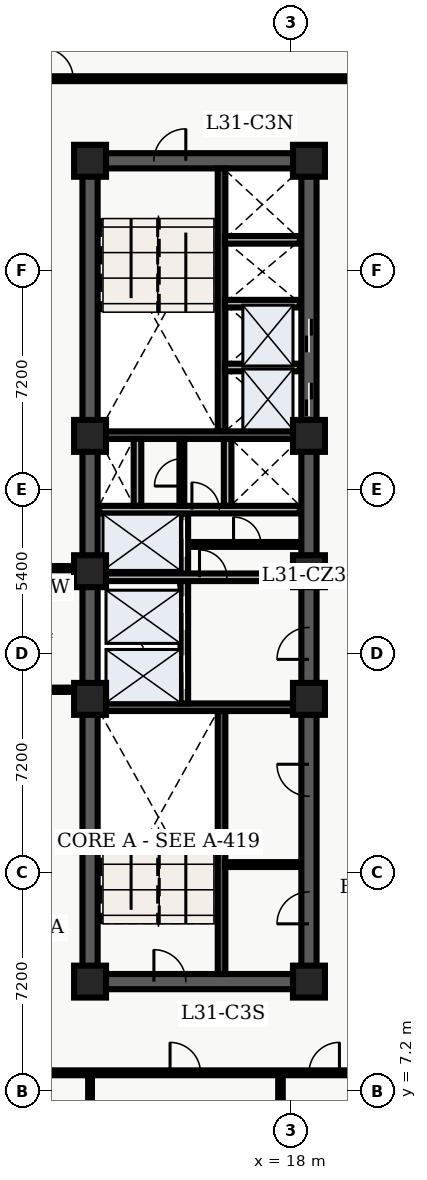
"""IFC4 building model, lengths in metres.
Left out: names, types, materials, properties, quantities, classifications, styles, units other than length and angle.
Written with IfcOpenShell. Run it as: python <this file> out.ifc"""

import sys

from ifc_helpers import new_model, entity, si_unit, converted_unit, direction, frame, origin_with_axes, origin_2d_with_axis, place, context, subcontext, project, spatial, polyline, rectangle, outline, extrude, element, fill, save


model = new_model("IFC4")
c1 = context("Model", 3, precision=1e-05, world=origin_with_axes(), true_north=direction((0.0, 1.0)))
c2 = subcontext(c1, "Body", "Model", "MODEL_VIEW")
j1 = project(units=[si_unit("LENGTHUNIT", "METRE"), converted_unit("PLANEANGLEUNIT", "DEGREE", entity("IfcPlaneAngleMeasure", 0.017), si_unit("PLANEANGLEUNIT", "RADIAN"), dimensions=[0, 0, 0, 0, 0, 0, 0])], contexts=[c1])
p1 = place(None, origin_with_axes())
s1 = spatial("IfcSite", under=j1, at=p1, CompositionType="ELEMENT")
p2 = place(p1, origin_with_axes())
s2 = spatial("IfcBuilding", under=s1, at=p2, CompositionType="ELEMENT")
p3 = place(p2, frame((0.0, 0.0, 129.0), z_axis=(0.0, 0.0, 1.0), x_axis=(1.0, 0.0, 0.0)))
s3 = spatial("IfcBuildingStorey", under=s2, at=p3, CompositionType="ELEMENT", Elevation=129.0)
p4 = place(p3, frame((11.4, 10.8, 0.0), z_axis=(0.0, 0.0, 1.0), x_axis=(0.0, 1.0, 0.0)))
e1 = element("IfcWall", 1, at=p4, inside=s3, PredefinedType="SHEAR", context=c2, shape_type="SweptSolid", body=[
    extrude(outline(polyline([(0.0, -0.25), (27.0, -0.25), (27.0, 0.25), (0.0, 0.25), (0.0, -0.25)])), origin_with_axes(), (0.0, 0.0, 1.0), 3.66),
])
p5 = place(p3, frame((11.4, 10.8, 0.0), z_axis=(0.0, 0.0, 1.0), x_axis=(1.0, 0.0, 0.0)))
e2 = element("IfcWall", 2, at=p5, inside=s3, PredefinedType="SHEAR", context=c2, shape_type="SweptSolid", body=[
    extrude(outline(polyline([(0.0, -0.25), (7.2, -0.25), (7.2, 0.25), (0.0, 0.25), (0.0, -0.25)])), origin_with_axes(), (0.0, 0.0, 1.0), 3.66),
])
p6 = place(p5, frame((2.625, 0.0, 0.0), z_axis=(0.0, 0.0, 1.0), x_axis=(1.0, 0.0, 0.0)))
e3 = element("IfcOpeningElement", 3, at=p6, cuts=e2, PredefinedType="OPENING", context=c2, shape_type="SweptSolid", body=[
    extrude(rectangle(XDim=1.05, YDim=0.52, at=origin_2d_with_axis()), origin_with_axes(), (0.0, 0.0, 1.0), 2.15),
])
p7 = place(p3, frame((11.4, 37.8, 0.0), z_axis=(0.0, 0.0, 1.0), x_axis=(1.0, 0.0, 0.0)))
e4 = element("IfcWall", 4, at=p7, inside=s3, PredefinedType="SHEAR", context=c2, shape_type="SweptSolid", body=[
    extrude(outline(polyline([(0.0, -0.25), (7.2, -0.25), (7.2, 0.25), (0.0, 0.25), (0.0, -0.25)])), origin_with_axes(), (0.0, 0.0, 1.0), 3.66),
])
p8 = place(p7, frame((2.625, 0.0, 0.0), z_axis=(0.0, 0.0, 1.0), x_axis=(1.0, 0.0, 0.0)))
e5 = element("IfcOpeningElement", 5, at=p8, cuts=e4, PredefinedType="OPENING", context=c2, shape_type="SweptSolid", body=[
    extrude(rectangle(XDim=1.05, YDim=0.52, at=origin_2d_with_axis()), origin_with_axes(), (0.0, 0.0, 1.0), 2.15),
])
p9 = place(p3, frame((18.6, 10.8, 0.0), z_axis=(0.0, 0.0, 1.0), x_axis=(0.0, 1.0, 0.0)))
e6 = element("IfcWall", 6, at=p9, inside=s3, PredefinedType="SHEAR", context=c2, shape_type="SweptSolid", body=[
    extrude(outline(polyline([(0.0, -0.25), (13.5, -0.25), (13.5, 0.25), (0.0, 0.25), (0.0, -0.25)])), origin_with_axes(), (0.0, 0.0, 1.0), 3.66),
])
p10 = place(p9, frame((11.125, 0.0, 0.0), z_axis=(0.0, 0.0, 1.0), x_axis=(1.0, 0.0, 0.0)))
e7 = element("IfcOpeningElement", 7, at=p10, cuts=e6, PredefinedType="OPENING", context=c2, shape_type="SweptSolid", body=[
    extrude(rectangle(XDim=1.05, YDim=0.52, at=origin_2d_with_axis()), origin_with_axes(), (0.0, 0.0, 1.0), 2.15),
])
p11 = place(p9, frame((2.425, 0.0, 0.0), z_axis=(0.0, 0.0, 1.0), x_axis=(1.0, 0.0, 0.0)))
e8 = element("IfcOpeningElement", 8, at=p11, cuts=e6, PredefinedType="OPENING", context=c2, shape_type="SweptSolid", body=[
    extrude(rectangle(XDim=1.05, YDim=0.52, at=origin_2d_with_axis()), origin_with_axes(), (0.0, 0.0, 1.0), 2.15),
])
p12 = place(p9, frame((6.625, 0.0, 0.0), z_axis=(0.0, 0.0, 1.0), x_axis=(1.0, 0.0, 0.0)))
e9 = element("IfcOpeningElement", 9, at=p12, cuts=e6, PredefinedType="OPENING", context=c2, shape_type="SweptSolid", body=[
    extrude(rectangle(XDim=1.05, YDim=0.52, at=origin_2d_with_axis()), origin_with_axes(), (0.0, 0.0, 1.0), 2.15),
])
p13 = place(p3, frame((18.6, 24.3, 0.0), z_axis=(0.0, 0.0, 1.0), x_axis=(0.0, 1.0, 0.0)))
e10 = element("IfcWall", 10, at=p13, inside=s3, PredefinedType="SHEAR", context=c2, shape_type="SweptSolid", body=[
    extrude(outline(polyline([(0.0, -0.25), (13.5, -0.25), (13.5, 0.25), (0.0, 0.25), (0.0, -0.25)])), origin_with_axes(), (0.0, 0.0, 1.0), 3.66),
])
p14 = place(p13, frame((5.65, 0.0, 0.0), z_axis=(0.0, 0.0, 1.0), x_axis=(1.0, 0.0, 0.0)))
e11 = element("IfcOpeningElement", 11, at=p14, cuts=e10, PredefinedType="OPENING", context=c2, shape_type="SweptSolid", body=[
    extrude(rectangle(XDim=1.1, YDim=0.52, at=origin_2d_with_axis()), origin_with_axes(), (0.0, 0.0, 1.0), 2.15),
])
p15 = place(p13, frame((7.75, 0.0, 0.0), z_axis=(0.0, 0.0, 1.0), x_axis=(1.0, 0.0, 0.0)))
e12 = element("IfcOpeningElement", 12, at=p15, cuts=e10, PredefinedType="OPENING", context=c2, shape_type="SweptSolid", body=[
    extrude(rectangle(XDim=1.1, YDim=0.52, at=origin_2d_with_axis()), origin_with_axes(), (0.0, 0.0, 1.0), 2.15),
])
p16 = place(p3, frame((15.725, 11.05, 0.0), z_axis=(0.0, 0.0, 1.0), x_axis=(0.0, 1.0, 0.0)))
e13 = element("IfcWall", 13, at=p16, inside=s3, PredefinedType="SHEAR", context=c2, shape_type="SweptSolid", body=[
    extrude(outline(polyline([(0.0, -0.125), (8.65, -0.125), (8.65, 0.125), (0.0, 0.125), (0.0, -0.125)])), origin_with_axes(), (0.0, 0.0, 1.0), 3.66),
])
p17 = place(p3, frame((11.65, 19.825, 0.0), z_axis=(0.0, 0.0, 1.0), x_axis=(1.0, 0.0, 0.0)))
e14 = element("IfcWall", 14, at=p17, inside=s3, PredefinedType="SHEAR", context=c2, shape_type="SweptSolid", body=[
    extrude(outline(polyline([(0.0, -0.125), (6.7, -0.125), (6.7, 0.125), (0.0, 0.125), (0.0, -0.125)])), origin_with_axes(), (0.0, 0.0, 1.0), 3.66),
])
p18 = place(p3, frame((15.725, 28.9, 0.0), z_axis=(0.0, 0.0, 1.0), x_axis=(0.0, 1.0, 0.0)))
e15 = element("IfcWall", 15, at=p18, inside=s3, PredefinedType="SHEAR", context=c2, shape_type="SweptSolid", body=[
    extrude(outline(polyline([(0.0, -0.125), (8.65, -0.125), (8.65, 0.125), (0.0, 0.125), (0.0, -0.125)])), origin_with_axes(), (0.0, 0.0, 1.0), 3.66),
])
p19 = place(p3, frame((11.65, 28.775, 0.0), z_axis=(0.0, 0.0, 1.0), x_axis=(1.0, 0.0, 0.0)))
e16 = element("IfcWall", 16, at=p19, inside=s3, PredefinedType="SHEAR", context=c2, shape_type="SweptSolid", body=[
    extrude(outline(polyline([(0.0, -0.125), (6.7, -0.125), (6.7, 0.125), (0.0, 0.125), (0.0, -0.125)])), origin_with_axes(), (0.0, 0.0, 1.0), 3.66),
])
p20 = place(p3, frame((14.5, 19.95, 0.0), z_axis=(0.0, 0.0, 1.0), x_axis=(0.0, 1.0, 0.0)))
e17 = element("IfcWall", 17, at=p20, inside=s3, PredefinedType="SOLIDWALL", context=c2, shape_type="SweptSolid", body=[
    extrude(outline(polyline([(0.0, -0.125), (6.25, -0.125), (6.25, 0.125), (0.0, 0.125), (0.0, -0.125)])), origin_with_axes(), (0.0, 0.0, 1.0), 2.7),
])
p21 = place(p20, frame((1.025, 0.0, 0.0), z_axis=(0.0, 0.0, 1.0), x_axis=(1.0, 0.0, 0.0)))
e18 = element("IfcOpeningElement", 18, at=p21, cuts=e17, PredefinedType="OPENING", context=c2, shape_type="SweptSolid", body=[
    extrude(rectangle(XDim=1.1, YDim=0.27, at=origin_2d_with_axis()), origin_with_axes(), (0.0, 0.0, 1.0), 2.15),
])
p22 = place(p20, frame((2.975, 0.0, 0.0), z_axis=(0.0, 0.0, 1.0), x_axis=(1.0, 0.0, 0.0)))
e19 = element("IfcOpeningElement", 19, at=p22, cuts=e17, PredefinedType="OPENING", context=c2, shape_type="SweptSolid", body=[
    extrude(rectangle(XDim=1.1, YDim=0.27, at=origin_2d_with_axis()), origin_with_axes(), (0.0, 0.0, 1.0), 2.15),
])
p23 = place(p20, frame((5.425, 0.0, 0.0), z_axis=(0.0, 0.0, 1.0), x_axis=(1.0, 0.0, 0.0)))
e20 = element("IfcOpeningElement", 20, at=p23, cuts=e17, PredefinedType="OPENING", context=c2, shape_type="SweptSolid", body=[
    extrude(rectangle(XDim=1.2, YDim=0.27, at=origin_2d_with_axis()), origin_with_axes(), (0.0, 0.0, 1.0), 2.15),
])
p24 = place(p3, frame((11.7, 24.1, 0.0), z_axis=(0.0, 0.0, 1.0), x_axis=(1.0, 0.0, 0.0)))
e21 = element("IfcWall", 21, at=p24, inside=s3, PredefinedType="SOLIDWALL", context=c2, shape_type="SweptSolid", body=[
    extrude(outline(polyline([(0.0, -0.125), (6.6, -0.125), (6.6, 0.125), (0.0, 0.125), (0.0, -0.125)])), origin_with_axes(), (0.0, 0.0, 1.0), 2.7),
])
p25 = place(p24, frame((3.75, 0.0, 0.0), z_axis=(0.0, 0.0, 1.0), x_axis=(1.0, 0.0, 0.0)))
e22 = element("IfcOpeningElement", 22, at=p25, cuts=e21, PredefinedType="OPENING", context=c2, shape_type="SweptSolid", body=[
    extrude(rectangle(XDim=0.9, YDim=0.27, at=origin_2d_with_axis()), origin_with_axes(), (0.0, 0.0, 1.0), 2.15),
])
p26 = place(p3, frame((11.7, 26.325, 0.0), z_axis=(0.0, 0.0, 1.0), x_axis=(1.0, 0.0, 0.0)))
e23 = element("IfcWall", 23, at=p26, inside=s3, PredefinedType="SOLIDWALL", context=c2, shape_type="SweptSolid", body=[
    extrude(outline(polyline([(0.0, -0.125), (6.6, -0.125), (6.6, 0.125), (0.0, 0.125), (0.0, -0.125)])), origin_with_axes(), (0.0, 0.0, 1.0), 2.7),
])
p27 = place(p26, frame((3.5, 0.0, 0.0), z_axis=(0.0, 0.0, 1.0), x_axis=(1.0, 0.0, 0.0)))
e24 = element("IfcOpeningElement", 24, at=p27, cuts=e23, PredefinedType="OPENING", context=c2, shape_type="SweptSolid", body=[
    extrude(rectangle(XDim=0.9, YDim=0.27, at=origin_2d_with_axis()), origin_with_axes(), (0.0, 0.0, 1.0), 2.15),
])
for number, where, z_axis, x_axis in (
    (25, (12.96, 26.45, 0.0), (0.0, 0.0, 1.0), (0.0, 1.0, 0.0)),
    (26, (15.925, 26.45, 0.0), (0.0, 0.0, 1.0), (0.0, 1.0, 0.0)),
):
    element("IfcWall", number, at=place(p3, frame(where, z_axis=z_axis, x_axis=x_axis)), inside=s3, PredefinedType="SOLIDWALL", context=c2, shape_type="SweptSolid", body=[
        extrude(outline(polyline([(0.0, -0.125), (2.2, -0.125), (2.2, 0.125), (0.0, 0.125), (0.0, -0.125)])), origin_with_axes(), (0.0, 0.0, 1.0), 2.7),
    ])
for number, where, z_axis, x_axis in (
    (27, (11.4, 10.8, 0.0), (0.0, 0.0, 1.0), (1.0, 0.0, 0.0)),
    (28, (11.4, 20.1, 0.0), (0.0, 0.0, 1.0), (1.0, 0.0, 0.0)),
    (29, (11.4, 24.3, 0.0), (0.0, 0.0, 1.0), (1.0, 0.0, 0.0)),
    (30, (11.4, 28.75, 0.0), (0.0, 0.0, 1.0), (1.0, 0.0, 0.0)),
    (31, (11.4, 37.8, 0.0), (0.0, 0.0, 1.0), (1.0, 0.0, 0.0)),
    (32, (18.6, 10.8, 0.0), (0.0, 0.0, 1.0), (1.0, 0.0, 0.0)),
    (33, (18.6, 20.1, 0.0), (0.0, 0.0, 1.0), (1.0, 0.0, 0.0)),
    (34, (18.6, 24.3, 0.0), (0.0, 0.0, 1.0), (1.0, 0.0, 0.0)),
    (35, (18.6, 28.75, 0.0), (0.0, 0.0, 1.0), (1.0, 0.0, 0.0)),
    (36, (18.6, 37.8, 0.0), (0.0, 0.0, 1.0), (1.0, 0.0, 0.0)),
):
    element("IfcColumn", number, at=place(p3, frame(where, z_axis=z_axis, x_axis=x_axis)), inside=s3, PredefinedType="COLUMN", context=c2, shape_type="SweptSolid", body=[
        extrude(rectangle(XDim=1.05, YDim=1.05, at=origin_2d_with_axis()), origin_with_axes(), (0.0, 0.0, 1.0), 3.9),
    ])
p28 = place(p3, frame((14.62, 25.18, 0.0), z_axis=(0.0, 0.0, 1.0), x_axis=(1.0, 0.0, 0.0)))
e37 = element("IfcWall", 37, at=p28, inside=s3, PredefinedType="PARTITIONING", context=c2, shape_type="SweptSolid", body=[
    extrude(outline(polyline([(0.0, -0.08), (3.68, -0.08), (3.68, 0.08), (0.0, 0.08), (0.0, -0.08)])), origin_with_axes(), (0.0, 0.0, 1.0), 2.7),
])
p29 = place(p28, frame((1.95, 0.0, 0.0), z_axis=(0.0, 0.0, 1.0), x_axis=(1.0, 0.0, 0.0)))
e38 = element("IfcOpeningElement", 38, at=p29, cuts=e37, PredefinedType="OPENING", context=c2, shape_type="SweptSolid", body=[
    extrude(rectangle(XDim=0.9, YDim=0.18, at=origin_2d_with_axis()), origin_with_axes(), (0.0, 0.0, 1.0), 2.15),
])
p30 = place(p3, frame((14.42, 26.45, 0.0), z_axis=(0.0, 0.0, 1.0), x_axis=(0.0, 1.0, 0.0)))
e39 = element("IfcWall", 39, at=p30, inside=s3, PredefinedType="PARTITIONING", context=c2, shape_type="SweptSolid", body=[
    extrude(outline(polyline([(0.0, -0.08), (2.2, -0.08), (2.2, 0.08), (0.0, 0.08), (0.0, -0.08)])), origin_with_axes(), (0.0, 0.0, 1.0), 2.7),
])
p31 = place(p30, frame((1.1, 0.0, 0.0), z_axis=(0.0, 0.0, 1.0), x_axis=(1.0, 0.0, 0.0)))
e40 = element("IfcOpeningElement", 40, at=p31, cuts=e39, PredefinedType="OPENING", context=c2, shape_type="SweptSolid", body=[
    extrude(rectangle(XDim=0.9, YDim=0.18, at=origin_2d_with_axis()), origin_with_axes(), (0.0, 0.0, 1.0), 2.15),
])
p32 = place(p3, frame((15.84, 14.65, 0.0), z_axis=(0.0, 0.0, 1.0), x_axis=(1.0, 0.0, 0.0)))
e41 = element("IfcWall", 41, at=p32, inside=s3, PredefinedType="PARTITIONING", context=c2, shape_type="SweptSolid", body=[
    extrude(outline(polyline([(0.0, -0.08), (2.46, -0.08), (2.46, 0.08), (0.0, 0.08), (0.0, -0.08)])), origin_with_axes(), (0.0, 0.0, 1.0), 2.7),
])
for number, where, z_axis, x_axis in (
    (42, (15.84, 31.0, 0.0), (0.0, 0.0, 1.0), (1.0, 0.0, 0.0)),
    (43, (15.84, 33.1, 0.0), (0.0, 0.0, 1.0), (1.0, 0.0, 0.0)),
    (44, (15.84, 35.2, 0.0), (0.0, 0.0, 1.0), (1.0, 0.0, 0.0)),
):
    element("IfcWall", number, at=place(p3, frame(where, z_axis=z_axis, x_axis=x_axis)), inside=s3, PredefinedType="SOLIDWALL", context=c2, shape_type="SweptSolid", body=[
        extrude(outline(polyline([(0.0, -0.125), (2.46, -0.125), (2.46, 0.125), (0.0, 0.125), (0.0, -0.125)])), origin_with_axes(), (0.0, 0.0, 1.0), 2.7),
    ])
for number, where, z_axis, x_axis in (
    (45, (9.52, 20.4, 0.0), (0.0, 0.0, 1.0), (1.0, 0.0, 0.0)),
    (46, (9.52, 24.4, 0.0), (0.0, 0.0, 1.0), (1.0, 0.0, 0.0)),
):
    element("IfcWall", number, at=place(p3, frame(where, z_axis=z_axis, x_axis=x_axis)), inside=s3, PredefinedType="PARTITIONING", context=c2, shape_type="SweptSolid", body=[
        extrude(outline(polyline([(0.0, -0.07), (1.58, -0.07), (1.58, 0.07), (0.0, 0.07), (0.0, -0.07)])), origin_with_axes(), (0.0, 0.0, 1.0), 2.7),
    ])
p33 = place(p3, frame((2.6, 7.8, 0.0), z_axis=(0.0, 0.0, 1.0), x_axis=(1.0, 0.0, 0.0)))
e47 = element("IfcWall", 47, at=p33, inside=s3, PredefinedType="PARTITIONING", context=c2, shape_type="SweptSolid", body=[
    extrude(outline(polyline([(0.0, -0.08), (18.55, -0.08), (18.55, 0.08), (0.0, 0.08), (0.0, -0.08)])), origin_with_axes(), (0.0, 0.0, 1.0), 2.7),
])
p34 = place(p33, frame((1.577, 0.0, 0.0), z_axis=(0.0, 0.0, 1.0), x_axis=(1.0, 0.0, 0.0)))
e48 = element("IfcOpeningElement", 48, at=p34, cuts=e47, PredefinedType="OPENING", context=c2, shape_type="SweptSolid", body=[
    extrude(rectangle(XDim=1.0, YDim=0.18, at=origin_2d_with_axis()), origin_with_axes(), (0.0, 0.0, 1.0), 2.15),
])
p35 = place(p33, frame((6.542, 0.0, 0.0), z_axis=(0.0, 0.0, 1.0), x_axis=(1.0, 0.0, 0.0)))
e49 = element("IfcOpeningElement", 49, at=p35, cuts=e47, PredefinedType="OPENING", context=c2, shape_type="SweptSolid", body=[
    extrude(rectangle(XDim=1.0, YDim=0.18, at=origin_2d_with_axis()), origin_with_axes(), (0.0, 0.0, 1.0), 2.15),
])
p36 = place(p33, frame((11.931, 0.0, 0.0), z_axis=(0.0, 0.0, 1.0), x_axis=(1.0, 0.0, 0.0)))
e50 = element("IfcOpeningElement", 50, at=p36, cuts=e47, PredefinedType="OPENING", context=c2, shape_type="SweptSolid", body=[
    extrude(rectangle(XDim=1.0, YDim=0.18, at=origin_2d_with_axis()), origin_with_axes(), (0.0, 0.0, 1.0), 2.15),
])
p37 = place(p33, frame((16.502, 0.0, 0.0), z_axis=(0.0, 0.0, 1.0), x_axis=(1.0, 0.0, 0.0)))
e51 = element("IfcOpeningElement", 51, at=p37, cuts=e47, PredefinedType="OPENING", context=c2, shape_type="SweptSolid", body=[
    extrude(rectangle(XDim=1.0, YDim=0.18, at=origin_2d_with_axis()), origin_with_axes(), (0.0, 0.0, 1.0), 2.15),
])
p38 = place(p3, frame((2.6, 40.5, 0.0), z_axis=(0.0, 0.0, 1.0), x_axis=(1.0, 0.0, 0.0)))
e52 = element("IfcWall", 52, at=p38, inside=s3, PredefinedType="PARTITIONING", context=c2, shape_type="SweptSolid", body=[
    extrude(outline(polyline([(0.0, -0.08), (18.693, -0.08), (18.693, 0.08), (0.0, 0.08), (0.0, -0.08)])), origin_with_axes(), (0.0, 0.0, 1.0), 2.7),
])
p39 = place(p38, frame((7.744, 0.0, 0.0), z_axis=(0.0, 0.0, 1.0), x_axis=(1.0, 0.0, 0.0)))
e53 = element("IfcOpeningElement", 53, at=p39, cuts=e52, PredefinedType="OPENING", context=c2, shape_type="SweptSolid", body=[
    extrude(rectangle(XDim=1.0, YDim=0.18, at=origin_2d_with_axis()), origin_with_axes(), (0.0, 0.0, 1.0), 2.15),
])
p40 = place(p3, frame((11.4, 0.335, 0.0), z_axis=(0.0, 0.0, 1.0), x_axis=(0.0, 1.0, 0.0)))
e54 = element("IfcWall", 54, at=p40, inside=s3, PredefinedType="PARTITIONING", context=c2, shape_type="SweptSolid", body=[
    extrude(outline(polyline([(0.0, -0.062), (7.365, -0.062), (7.365, 0.062), (0.0, 0.062), (0.0, -0.062)])), origin_with_axes(), (0.0, 0.0, 1.0), 2.7),
])
p41 = place(p3, frame((17.663, 0.335, 0.0), z_axis=(0.0, 0.0, 1.0), x_axis=(0.0, 1.0, 0.0)))
e55 = element("IfcWall", 55, at=p41, inside=s3, PredefinedType="PARTITIONING", context=c2, shape_type="SweptSolid", body=[
    extrude(outline(polyline([(0.0, -0.075), (7.365, -0.075), (7.365, 0.075), (0.0, 0.075), (0.0, -0.075)])), origin_with_axes(), (0.0, 0.0, 1.0), 2.7),
])
p42 = place(p13, frame((5.65, 0.0, 0.0), z_axis=(0.0, 0.0, 1.0), x_axis=(1.0, 0.0, 0.0)))
e56 = element("IfcDoor", 56, at=p42, inside=s3, OperationType="SLIDING_TO_LEFT", PredefinedType="DOOR", context=c2, shape_type="SweptSolid", body=[
    extrude(rectangle(XDim=1.1, YDim=0.09, at=origin_2d_with_axis()), origin_with_axes(), (0.0, 0.0, 1.0), 2.15),
])
fill(e11, e56)
p43 = place(p13, frame((7.75, 0.0, 0.0), z_axis=(0.0, 0.0, 1.0), x_axis=(1.0, 0.0, 0.0)))
e57 = element("IfcDoor", 57, at=p43, inside=s3, OperationType="SLIDING_TO_RIGHT", PredefinedType="DOOR", context=c2, shape_type="SweptSolid", body=[
    extrude(rectangle(XDim=1.1, YDim=0.09, at=origin_2d_with_axis()), origin_with_axes(), (0.0, 0.0, 1.0), 2.15),
])
fill(e12, e57)
p44 = place(p20, frame((1.025, 0.0, 0.0), z_axis=(0.0, 0.0, 1.0), x_axis=(1.0, 0.0, 0.0)))
e58 = element("IfcDoor", 58, at=p44, inside=s3, OperationType="SLIDING_TO_LEFT", PredefinedType="DOOR", context=c2, shape_type="SweptSolid", body=[
    extrude(rectangle(XDim=1.1, YDim=0.09, at=origin_2d_with_axis()), origin_with_axes(), (0.0, 0.0, 1.0), 2.15),
])
fill(e18, e58)
p45 = place(p20, frame((2.975, 0.0, 0.0), z_axis=(0.0, 0.0, 1.0), x_axis=(1.0, 0.0, 0.0)))
e59 = element("IfcDoor", 59, at=p45, inside=s3, OperationType="SLIDING_TO_RIGHT", PredefinedType="DOOR", context=c2, shape_type="SweptSolid", body=[
    extrude(rectangle(XDim=1.1, YDim=0.09, at=origin_2d_with_axis()), origin_with_axes(), (0.0, 0.0, 1.0), 2.15),
])
fill(e19, e59)
p46 = place(p20, frame((5.425, 0.0, 0.0), z_axis=(0.0, 0.0, 1.0), x_axis=(1.0, 0.0, 0.0)))
e60 = element("IfcDoor", 60, at=p46, inside=s3, OperationType="DOUBLE_DOOR_SLIDING", PredefinedType="DOOR", context=c2, shape_type="SweptSolid", body=[
    extrude(rectangle(XDim=1.2, YDim=0.09, at=origin_2d_with_axis()), origin_with_axes(), (0.0, 0.0, 1.0), 2.15),
])
fill(e20, e60)
p47 = place(p5, frame((2.625, 0.0, 0.0), z_axis=(0.0, 0.0, 1.0), x_axis=(1.0, 0.0, 0.0)))
e61 = element("IfcDoor", 61, at=p47, inside=s3, OperationType="SINGLE_SWING_LEFT", PredefinedType="DOOR", context=c2, shape_type="SweptSolid", body=[
    extrude(rectangle(XDim=1.05, YDim=0.09, at=origin_2d_with_axis()), origin_with_axes(), (0.0, 0.0, 1.0), 2.15),
])
fill(e3, e61)
p48 = place(p7, frame((2.625, 0.0, 0.0), z_axis=(0.0, 0.0, 1.0), x_axis=(1.0, 0.0, 0.0)))
e62 = element("IfcDoor", 62, at=p48, inside=s3, OperationType="SINGLE_SWING_RIGHT", PredefinedType="DOOR", context=c2, shape_type="SweptSolid", body=[
    extrude(rectangle(XDim=1.05, YDim=0.09, at=origin_2d_with_axis()), origin_with_axes(), (0.0, 0.0, 1.0), 2.15),
])
fill(e5, e62)
p49 = place(p9, frame((11.125, 0.0, 0.0), z_axis=(0.0, 0.0, 1.0), x_axis=(1.0, 0.0, 0.0)))
e63 = element("IfcDoor", 63, at=p49, inside=s3, OperationType="SINGLE_SWING_LEFT", PredefinedType="DOOR", context=c2, shape_type="SweptSolid", body=[
    extrude(rectangle(XDim=1.05, YDim=0.09, at=origin_2d_with_axis()), origin_with_axes(), (0.0, 0.0, 1.0), 2.15),
])
fill(e7, e63)
p50 = place(p26, frame((3.5, 0.0, 0.0), z_axis=(0.0, 0.0, 1.0), x_axis=(1.0, 0.0, 0.0)))
e64 = element("IfcDoor", 64, at=p50, inside=s3, OperationType="SINGLE_SWING_LEFT", PredefinedType="DOOR", context=c2, shape_type="SweptSolid", body=[
    extrude(rectangle(XDim=0.9, YDim=0.09, at=origin_2d_with_axis()), origin_with_axes(), (0.0, 0.0, 1.0), 2.15),
])
fill(e24, e64)
p51 = place(p30, frame((1.1, 0.0, 0.0), z_axis=(0.0, 0.0, 1.0), x_axis=(1.0, 0.0, 0.0)))
e65 = element("IfcDoor", 65, at=p51, inside=s3, OperationType="SINGLE_SWING_LEFT", PredefinedType="DOOR", context=c2, shape_type="SweptSolid", body=[
    extrude(rectangle(XDim=0.9, YDim=0.09, at=origin_2d_with_axis()), origin_with_axes(), (0.0, 0.0, 1.0), 2.15),
])
fill(e40, e65)
p52 = place(p24, frame((3.75, 0.0, 0.0), z_axis=(0.0, 0.0, 1.0), x_axis=(1.0, 0.0, 0.0)))
e66 = element("IfcDoor", 66, at=p52, inside=s3, OperationType="SINGLE_SWING_LEFT", PredefinedType="DOOR", context=c2, shape_type="SweptSolid", body=[
    extrude(rectangle(XDim=0.9, YDim=0.09, at=origin_2d_with_axis()), origin_with_axes(), (0.0, 0.0, 1.0), 2.15),
])
fill(e22, e66)
p53 = place(p28, frame((1.95, 0.0, 0.0), z_axis=(0.0, 0.0, 1.0), x_axis=(1.0, 0.0, 0.0)))
e67 = element("IfcDoor", 67, at=p53, inside=s3, OperationType="SINGLE_SWING_LEFT", PredefinedType="DOOR", context=c2, shape_type="SweptSolid", body=[
    extrude(rectangle(XDim=0.9, YDim=0.09, at=origin_2d_with_axis()), origin_with_axes(), (0.0, 0.0, 1.0), 2.15),
])
fill(e38, e67)
p54 = place(p9, frame((2.425, 0.0, 0.0), z_axis=(0.0, 0.0, 1.0), x_axis=(1.0, 0.0, 0.0)))
e68 = element("IfcDoor", 68, at=p54, inside=s3, OperationType="SINGLE_SWING_LEFT", PredefinedType="DOOR", context=c2, shape_type="SweptSolid", body=[
    extrude(rectangle(XDim=1.05, YDim=0.09, at=origin_2d_with_axis()), origin_with_axes(), (0.0, 0.0, 1.0), 2.15),
])
fill(e8, e68)
p55 = place(p9, frame((6.625, 0.0, 0.0), z_axis=(0.0, 0.0, 1.0), x_axis=(1.0, 0.0, 0.0)))
e69 = element("IfcDoor", 69, at=p55, inside=s3, OperationType="SINGLE_SWING_RIGHT", PredefinedType="DOOR", context=c2, shape_type="SweptSolid", body=[
    extrude(rectangle(XDim=1.05, YDim=0.09, at=origin_2d_with_axis()), origin_with_axes(), (0.0, 0.0, 1.0), 2.15),
])
fill(e9, e69)
p56 = place(p33, frame((11.931, 0.0, 0.0), z_axis=(0.0, 0.0, 1.0), x_axis=(1.0, 0.0, 0.0)))
e70 = element("IfcDoor", 70, at=p56, inside=s3, OperationType="SINGLE_SWING_LEFT", PredefinedType="DOOR", context=c2, shape_type="SweptSolid", body=[
    extrude(rectangle(XDim=1.0, YDim=0.09, at=origin_2d_with_axis()), origin_with_axes(), (0.0, 0.0, 1.0), 2.15),
])
fill(e50, e70)
p57 = place(p33, frame((16.502, 0.0, 0.0), z_axis=(0.0, 0.0, 1.0), x_axis=(1.0, 0.0, 0.0)))
e71 = element("IfcDoor", 71, at=p57, inside=s3, OperationType="SINGLE_SWING_RIGHT", PredefinedType="DOOR", context=c2, shape_type="SweptSolid", body=[
    extrude(rectangle(XDim=1.0, YDim=0.09, at=origin_2d_with_axis()), origin_with_axes(), (0.0, 0.0, 1.0), 2.15),
])
fill(e51, e71)
p58 = place(p38, frame((7.744, 0.0, 0.0), z_axis=(0.0, 0.0, 1.0), x_axis=(1.0, 0.0, 0.0)))
e72 = element("IfcDoor", 72, at=p58, inside=s3, OperationType="SINGLE_SWING_LEFT", PredefinedType="DOOR", context=c2, shape_type="SweptSolid", body=[
    extrude(rectangle(XDim=1.0, YDim=0.09, at=origin_2d_with_axis()), origin_with_axes(), (0.0, 0.0, 1.0), 2.15),
])
fill(e53, e72)
save(model, sys.argv[1])
